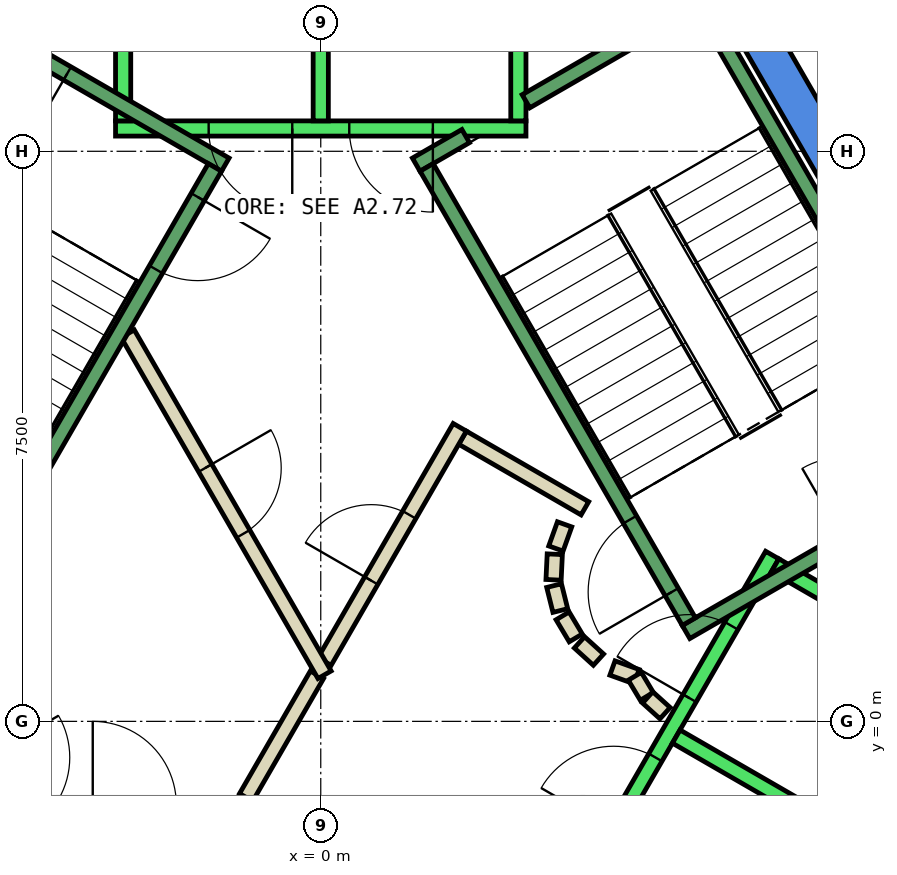
"""IFC4 building model, lengths in metres.
Left out: names, types, materials, properties, quantities, classifications, styles, units other than length and angle.
Written with IfcOpenShell. Run it as: python <this file> out.ifc"""

import sys

from ifc_helpers import new_model, si_unit, direction, frame, frame_2d, origin, place, context, subcontext, project, spatial, polyline, rectangle, outline, extrude, element, fill, save


model = new_model("IFC4")
c1 = context("Model", 3, precision=1e-05, world=origin(), true_north=direction((0.0, 1.0)))
c2 = subcontext(c1, "Body", "Model", "MODEL_VIEW")
j1 = project(units=[si_unit("LENGTHUNIT", "METRE"), si_unit("PLANEANGLEUNIT", "RADIAN")], contexts=[c1])
p1 = place(None, origin())
s1 = spatial("IfcSite", under=j1, at=p1, CompositionType="ELEMENT")
p2 = place(p1, origin())
s2 = spatial("IfcBuilding", under=s1, at=p2, CompositionType="ELEMENT")
p3 = place(p2, frame((0.0, 0.0, 340.4)))
s3 = spatial("IfcBuildingStorey", under=s2, at=p3, CompositionType="ELEMENT", Elevation=340.4)
p4 = place(p3, frame((0.0, 0.0, -0.45)))
e1 = element("IfcWall", 1, at=p4, inside=s3, PredefinedType="SHEAR", context=c2, shape_type="SweptSolid", body=[
    extrude(outline(polyline([(5.486, 9.998), (5.053, 9.748), (9.238, 2.5), (9.815, 2.5), (5.486, 9.998)])), origin(), (0.0, 0.0, 1.0), 4.6),
])
p5 = place(p3, frame((0.0, 0.0, -0.45)))
e2 = element("IfcWall", 2, at=p5, inside=s3, PredefinedType="SHEAR", context=c2, shape_type="SweptSolid", body=[
    extrude(outline(polyline([(4.907, -6.0), (9.815, 2.5), (9.238, 2.5), (4.619, -5.5), (4.907, -6.0)])), origin(), (0.0, 0.0, 1.0), 4.6),
])
p6 = place(p3, frame((-0.982, -1.0, 0.0), z_axis=(0.0, 0.0, 1.0), x_axis=(0.50024047865, 0.865886518847, 0.0)))
e3 = element("IfcWall", 3, at=p6, inside=s3, PredefinedType="PARTITIONING", context=c2, shape_type="SweptSolid", body=[
    extrude(rectangle(XDim=1.863, YDim=0.2, at=frame_2d((0.931, 0.0))), origin(), (0.0, 0.0, 1.0), 4.15),
])
p7 = place(p3, frame((1.866, 3.732, 0.0), z_axis=(0.0, 0.0, 1.0), x_axis=(0.866043361281, -0.499968895414, 0.0)))
e4 = element("IfcWall", 4, at=p7, inside=s3, PredefinedType="PARTITIONING", context=c2, shape_type="SweptSolid", body=[
    extrude(rectangle(XDim=1.858, YDim=0.2, at=frame_2d((0.929, 0.0))), origin(), (0.0, 0.0, 1.0), 4.15),
])
p8 = place(p3, frame((3.208, 2.592, 0.0), z_axis=(0.0, 0.0, 1.0), x_axis=(-0.337388820924, -0.941365382578, 0.0)))
e5 = element("IfcWall", 5, at=p8, inside=s3, PredefinedType="PARTITIONING", context=c2, shape_type="SweptSolid", body=[
    extrude(rectangle(XDim=0.338, YDim=0.2, at=frame_2d((0.169, 0.0))), origin(), (0.0, 0.0, 1.0), 4.15),
])
p9 = place(p3, frame((3.079, 2.199, 0.0), z_axis=(0.0, 0.0, 1.0), x_axis=(-0.047771483479, -0.998858290933, 0.0)))
e6 = element("IfcWall", 6, at=p9, inside=s3, PredefinedType="PARTITIONING", context=c2, shape_type="SweptSolid", body=[
    extrude(rectangle(XDim=0.337, YDim=0.2, at=frame_2d((0.169, 0.0))), origin(), (0.0, 0.0, 1.0), 4.15),
])
p10 = place(p3, frame((3.07, 1.786, 0.0), z_axis=(0.0, 0.0, 1.0), x_axis=(0.242705583207, -0.970099994784, 0.0)))
e7 = element("IfcWall", 7, at=p10, inside=s3, PredefinedType="PARTITIONING", context=c2, shape_type="SweptSolid", body=[
    extrude(rectangle(XDim=0.338, YDim=0.2, at=frame_2d((0.169, 0.0))), origin(), (0.0, 0.0, 1.0), 4.15),
])
for number, where, z_axis, x_axis in (
    (8, (3.182, 1.388, 0.0), (0.0, 0.0, 1.0), (0.512, -0.859, 0.0)),
    (9, (3.404, 1.039, 0.0), (0.0, 0.0, 1.0), (0.74, -0.672, 0.0)),
):
    element("IfcWall", number, at=place(p3, frame(where, z_axis=z_axis, x_axis=x_axis)), inside=s3, PredefinedType="PARTITIONING", context=c2, shape_type="SweptSolid", body=[
        extrude(rectangle(XDim=0.338, YDim=0.2, at=frame_2d((0.169, 0.0))), origin(), (0.0, 0.0, 1.0), 4.15),
    ])
p11 = place(p3, frame((3.838, 0.702, 0.0), z_axis=(0.0, 0.0, 1.0), x_axis=(0.941035081519, -0.338308993895, 0.0)))
e10 = element("IfcWall", 10, at=p11, inside=s3, PredefinedType="PARTITIONING", context=c2, shape_type="SweptSolid", body=[
    extrude(rectangle(XDim=0.337, YDim=0.2, at=frame_2d((0.168, 0.0))), origin(), (0.0, 0.0, 1.0), 4.15),
])
p12 = place(p3, frame((4.132, 0.593, 0.0), z_axis=(0.0, 0.0, 1.0), x_axis=(0.513561617048, -0.858052717201, 0.0)))
e11 = element("IfcWall", 11, at=p12, inside=s3, PredefinedType="PARTITIONING", context=c2, shape_type="SweptSolid", body=[
    extrude(rectangle(XDim=0.308, YDim=0.2, at=frame_2d((0.154, 0.0))), origin(), (0.0, 0.0, 1.0), 4.15),
])
p13 = place(p3, frame((4.301, 0.315, 0.0), z_axis=(0.0, 0.0, 1.0), x_axis=(0.741798017506, -0.670623367639, 0.0)))
e12 = element("IfcWall", 12, at=p13, inside=s3, PredefinedType="PARTITIONING", context=c2, shape_type="SweptSolid", body=[
    extrude(rectangle(XDim=0.309, YDim=0.2, at=frame_2d((0.154, 0.0))), origin(), (0.0, 0.0, 1.0), 4.15),
])
p14 = place(p3, frame((0.05, 0.787, 0.0), z_axis=(0.0, 0.0, 1.0), x_axis=(0.499954076797, 0.866051915934, 0.0)))
e13 = element("IfcWall", 13, at=p14, inside=s3, PredefinedType="PARTITIONING", context=c2, shape_type="SweptSolid", body=[
    extrude(rectangle(XDim=3.558, YDim=0.2, at=frame_2d((1.779, 0.0))), origin(), (0.0, 0.0, 1.0), 4.15),
])
p15 = place(p14, frame((1.229, 0.0, 0.0)))
e14 = element("IfcOpeningElement", 14, at=p15, cuts=e13, PredefinedType="OPENING", context=c2, shape_type="SweptSolid", body=[
    extrude(rectangle(XDim=1.0, YDim=2.1, at=frame_2d((0.5, 1.05))), frame((0.0, 0.11, 0.0), z_axis=(0.0, -1.0, 0.0), x_axis=(1.0, 0.0, 0.0)), (0.0, 0.0, 1.0), 0.22),
])
p16 = place(p3, frame((-2.54, 5.1, 0.0), z_axis=(0.0, 0.0, 1.0), x_axis=(0.499925051871, -0.866068670783, 0.0)))
e15 = element("IfcWall", 15, at=p16, inside=s3, PredefinedType="PARTITIONING", context=c2, shape_type="SweptSolid", body=[
    extrude(rectangle(XDim=5.181, YDim=0.2, at=frame_2d((2.59, 0.0))), origin(), (0.0, 0.0, 1.0), 4.15),
])
p17 = place(p16, frame((2.04, 0.0, 0.0)))
e16 = element("IfcOpeningElement", 16, at=p17, cuts=e15, PredefinedType="OPENING", context=c2, shape_type="SweptSolid", body=[
    extrude(rectangle(XDim=1.0, YDim=2.1, at=frame_2d((0.5, 1.05))), frame((0.0, 0.11, 0.0), z_axis=(0.0, -1.0, 0.0), x_axis=(1.0, 0.0, 0.0)), (0.0, 0.0, 1.0), 0.22),
])
p18 = place(p3, frame((5.532, 14.717, 0.0), z_axis=(0.0, 0.0, 1.0), x_axis=(0.499968011863, -0.866043871356, 0.0)))
e17 = element("IfcWall", 17, at=p18, inside=s3, PredefinedType="PARTITIONING", context=c2, shape_type="SweptSolid", body=[
    extrude(rectangle(XDim=7.201, YDim=0.2, at=frame_2d((3.6, 0.0))), origin(), (0.0, 0.0, 1.0), 4.15),
])
p19 = place(p18, frame((3.18, 0.0, 0.0)))
e18 = element("IfcOpeningElement", 18, at=p19, cuts=e17, PredefinedType="OPENING", context=c2, shape_type="SweptSolid", body=[
    extrude(rectangle(XDim=1.0, YDim=2.1, at=frame_2d((0.5, 1.05))), frame((0.0, 0.11, 0.0), z_axis=(0.0, -1.0, 0.0), x_axis=(1.0, 0.0, 0.0)), (0.0, 0.0, 1.0), 0.22),
])
p20 = place(p3, frame((2.7, 7.8, 0.0), z_axis=(0.0, 0.0, 1.0), x_axis=(-1.0, 0.0, 0.0)))
e19 = element("IfcWall", 19, at=p20, inside=s3, PredefinedType="STANDARD", context=c2, shape_type="SweptSolid", body=[
    extrude(rectangle(XDim=5.4, YDim=0.2, at=frame_2d((2.7, 0.0))), origin(), (0.0, 0.0, 1.0), 4.15),
])
p21 = place(p20, frame((1.225, 0.0, 0.0)))
e20 = element("IfcOpeningElement", 20, at=p21, cuts=e19, PredefinedType="OPENING", context=c2, shape_type="SweptSolid", body=[
    extrude(rectangle(XDim=1.1, YDim=2.1, at=frame_2d((0.55, 1.05))), frame((0.0, 0.11, 0.0), z_axis=(0.0, -1.0, 0.0), x_axis=(1.0, 0.0, 0.0)), (0.0, 0.0, 1.0), 0.22),
])
p22 = place(p20, frame((3.075, 0.0, 0.0)))
e21 = element("IfcOpeningElement", 21, at=p22, cuts=e19, PredefinedType="OPENING", context=c2, shape_type="SweptSolid", body=[
    extrude(rectangle(XDim=1.1, YDim=2.1, at=frame_2d((0.55, 1.05))), frame((0.0, 0.11, 0.0), z_axis=(0.0, -1.0, 0.0), x_axis=(1.0, 0.0, 0.0)), (0.0, 0.0, 1.0), 0.22),
])
for number, where, z_axis, x_axis in (
    (22, (2.6, 7.9, 0.0), (0.0, 0.0, 1.0), (0.0, 1.0, 0.0)),
    (23, (0.0, 7.9, 0.0), (0.0, 0.0, 1.0), (0.0, 1.0, 0.0)),
    (24, (-2.6, 7.9, 0.0), (0.0, 0.0, 1.0), (0.0, 1.0, 0.0)),
):
    element("IfcWall", number, at=place(p3, frame(where, z_axis=z_axis, x_axis=x_axis)), inside=s3, PredefinedType="STANDARD", context=c2, shape_type="SweptSolid", body=[
        extrude(rectangle(XDim=2.4, YDim=0.2, at=frame_2d((1.2, 0.0))), origin(), (0.0, 0.0, 1.0), 4.15),
    ])
p23 = place(p3, frame((-5.94, 2.188, 0.0), z_axis=(0.0, 0.0, 1.0), x_axis=(0.500034260056, -0.866005622828, 0.0)))
e25 = element("IfcWall", 25, at=p23, inside=s3, PredefinedType="STANDARD", context=c2, shape_type="SweptSolid", body=[
    extrude(rectangle(XDim=5.399, YDim=0.2, at=frame_2d((2.7, 0.0))), origin(), (0.0, 0.0, 1.0), 4.15),
])
p24 = place(p23, frame((3.075, 0.0, 0.0)))
e26 = element("IfcOpeningElement", 26, at=p24, cuts=e25, PredefinedType="OPENING", context=c2, shape_type="SweptSolid", body=[
    extrude(rectangle(XDim=1.1, YDim=2.1, at=frame_2d((0.55, 1.05))), frame((0.0, 0.11, 0.0), z_axis=(0.0, -1.0, 0.0), x_axis=(1.0, 0.0, 0.0)), (0.0, 0.0, 1.0), 0.22),
])
p25 = place(p23, frame((1.225, 0.0, 0.0)))
e27 = element("IfcOpeningElement", 27, at=p25, cuts=e25, PredefinedType="OPENING", context=c2, shape_type="SweptSolid", body=[
    extrude(rectangle(XDim=1.1, YDim=2.1, at=frame_2d((0.55, 1.05))), frame((0.0, 0.11, 0.0), z_axis=(0.0, -1.0, 0.0), x_axis=(1.0, 0.0, 0.0)), (0.0, 0.0, 1.0), 0.22),
])
p26 = place(p3, frame((3.24, -2.488, 0.0), z_axis=(0.0, 0.0, 1.0), x_axis=(0.500034260056, 0.866005622828, 0.0)))
e28 = element("IfcWall", 28, at=p26, inside=s3, PredefinedType="STANDARD", context=c2, shape_type="SweptSolid", body=[
    extrude(rectangle(XDim=5.399, YDim=0.2, at=frame_2d((2.7, 0.0))), origin(), (0.0, 0.0, 1.0), 4.15),
])
p27 = place(p26, frame((3.225, 0.0, 0.0)))
e29 = element("IfcOpeningElement", 29, at=p27, cuts=e28, PredefinedType="OPENING", context=c2, shape_type="SweptSolid", body=[
    extrude(rectangle(XDim=1.1, YDim=2.1, at=frame_2d((0.55, 1.05))), frame((0.0, 0.11, 0.0), z_axis=(0.0, -1.0, 0.0), x_axis=(1.0, 0.0, 0.0)), (0.0, 0.0, 1.0), 0.22),
])
p28 = place(p26, frame((1.225, 0.0, 0.0)))
e30 = element("IfcOpeningElement", 30, at=p28, cuts=e28, PredefinedType="OPENING", context=c2, shape_type="SweptSolid", body=[
    extrude(rectangle(XDim=1.1, YDim=2.1, at=frame_2d((0.55, 1.05))), frame((0.0, 0.11, 0.0), z_axis=(0.0, -1.0, 0.0), x_axis=(1.0, 0.0, 0.0)), (0.0, 0.0, 1.0), 0.22),
])
p29 = place(p3, frame((5.492, -3.788, 0.0), z_axis=(0.0, 0.0, 1.0), x_axis=(0.500034260056, 0.866005622828, 0.0)))
e31 = element("IfcWall", 31, at=p29, inside=s3, PredefinedType="STANDARD", context=c2, shape_type="SweptSolid", body=[
    extrude(rectangle(XDim=5.399, YDim=0.2, at=frame_2d((2.7, 0.0))), origin(), (0.0, 0.0, 1.0), 4.15),
])
for number, where, z_axis, x_axis in (
    (32, (4.677, -0.2, 0.0), (0.0, 0.0, 1.0), (0.866, -0.5, 0.0)),
    (33, (5.977, 2.052, 0.0), (0.0, 0.0, 1.0), (0.866, -0.5, 0.0)),
):
    element("IfcWall", number, at=place(p3, frame(where, z_axis=z_axis, x_axis=x_axis)), inside=s3, PredefinedType="STANDARD", context=c2, shape_type="SweptSolid", body=[
        extrude(rectangle(XDim=2.399, YDim=0.2, at=frame_2d((1.2, 0.0))), origin(), (0.0, 0.0, 1.0), 4.15),
    ])
p30 = place(p3, frame((4.806, 1.176, 0.0), z_axis=(0.0, 0.0, 1.0), x_axis=(0.866059941101, 0.499940174841, 0.0)))
e34 = element("IfcWall", 34, at=p30, inside=s3, PredefinedType="STANDARD", context=c2, shape_type="SweptSolid", body=[
    extrude(rectangle(XDim=4.4, YDim=0.2, at=frame_2d((2.2, 0.0))), origin(), (0.0, 0.0, 1.0), 4.15),
])
p31 = place(p30, frame((2.4, 0.0, 0.0)))
e35 = element("IfcOpeningElement", 35, at=p31, cuts=e34, PredefinedType="OPENING", context=c2, shape_type="SweptSolid", body=[
    extrude(rectangle(XDim=1.1, YDim=2.2, at=frame_2d((0.55, 1.1))), frame((0.0, 0.11, 0.0), z_axis=(0.0, -1.0, 0.0), x_axis=(1.0, 0.0, 0.0)), (0.0, 0.0, 1.0), 0.22),
])
p32 = place(p3, frame((2.7, 8.158, 0.0), z_axis=(0.0, 0.0, 1.0), x_axis=(0.86611865017, 0.499838457731, 0.0)))
e36 = element("IfcWall", 36, at=p32, inside=s3, PredefinedType="STANDARD", context=c2, shape_type="SweptSolid", body=[
    extrude(rectangle(XDim=2.733, YDim=0.2, at=frame_2d((1.366, 0.0))), origin(), (0.0, 0.0, 1.0), 4.15),
])
p33 = place(p3, frame((1.256, 7.324, 0.0), z_axis=(0.0, 0.0, 1.0), x_axis=(0.865915093549, 0.500191014278, 0.0)))
e37 = element("IfcWall", 37, at=p33, inside=s3, PredefinedType="STANDARD", context=c2, shape_type="SweptSolid", body=[
    extrude(rectangle(XDim=0.752, YDim=0.2, at=frame_2d((0.376, 0.0))), origin(), (0.0, 0.0, 1.0), 4.15),
])
p34 = place(p3, frame((4.843, 1.312, 0.0), z_axis=(0.0, 0.0, 1.0), x_axis=(-0.499963383562, 0.866046543262, 0.0)))
e38 = element("IfcWall", 38, at=p34, inside=s3, PredefinedType="STANDARD", context=c2, shape_type="SweptSolid", body=[
    extrude(rectangle(XDim=6.9, YDim=0.2, at=frame_2d((3.45, 0.0))), origin(), (0.0, 0.0, 1.0), 4.15),
])
p35 = place(p34, frame((0.45, 0.0, 0.0)))
e39 = element("IfcOpeningElement", 39, at=p35, cuts=e38, PredefinedType="OPENING", context=c2, shape_type="SweptSolid", body=[
    extrude(rectangle(XDim=1.1, YDim=2.2, at=frame_2d((0.55, 1.1))), frame((0.0, 0.11, 0.0), z_axis=(0.0, -1.0, 0.0), x_axis=(1.0, 0.0, 0.0)), (0.0, 0.0, 1.0), 0.22),
])
p36 = place(p3, frame((8.48, 3.412, 0.0), z_axis=(0.0, 0.0, 1.0), x_axis=(-0.499978703459, 0.866037698999, 0.0)))
e40 = element("IfcWall", 40, at=p36, inside=s3, PredefinedType="STANDARD", context=c2, shape_type="SweptSolid", body=[
    extrude(rectangle(XDim=6.9, YDim=0.2, at=frame_2d((3.45, 0.0))), origin(), (0.0, 0.0, 1.0), 4.15),
])
p37 = place(p3, frame((-1.256, 7.324, 0.0), z_axis=(0.0, 0.0, 1.0), x_axis=(-0.866046073146, 0.499964197906, 0.0)))
e41 = element("IfcWall", 41, at=p37, inside=s3, PredefinedType="STANDARD", context=c2, shape_type="SweptSolid", body=[
    extrude(rectangle(XDim=4.4, YDim=0.2, at=frame_2d((2.2, 0.0))), origin(), (0.0, 0.0, 1.0), 4.15),
])
p38 = place(p37, frame((2.4, 0.0, 0.0)))
e42 = element("IfcOpeningElement", 42, at=p38, cuts=e41, PredefinedType="OPENING", context=c2, shape_type="SweptSolid", body=[
    extrude(rectangle(XDim=1.1, YDim=2.2, at=frame_2d((0.55, 1.1))), frame((0.0, 0.11, 0.0), z_axis=(0.0, -1.0, 0.0), x_axis=(1.0, 0.0, 0.0)), (0.0, 0.0, 1.0), 0.22),
])
p39 = place(p3, frame((-1.393, 7.288, 0.0), z_axis=(0.0, 0.0, 1.0), x_axis=(-0.499963383562, -0.866046543262, 0.0)))
e43 = element("IfcWall", 43, at=p39, inside=s3, PredefinedType="STANDARD", context=c2, shape_type="SweptSolid", body=[
    extrude(rectangle(XDim=6.9, YDim=0.2, at=frame_2d((3.45, 0.0))), origin(), (0.0, 0.0, 1.0), 4.15),
])
p40 = place(p39, frame((0.45, 0.0, 0.0)))
e44 = element("IfcOpeningElement", 44, at=p40, cuts=e43, PredefinedType="OPENING", context=c2, shape_type="SweptSolid", body=[
    extrude(rectangle(XDim=1.1, YDim=2.2, at=frame_2d((0.55, 1.1))), frame((0.0, 0.11, 0.0), z_axis=(0.0, -1.0, 0.0), x_axis=(1.0, 0.0, 0.0)), (0.0, 0.0, 1.0), 0.22),
])
p41 = place(p15, origin())
e45 = element("IfcDoor", 45, at=p41, inside=s3, OperationType="SINGLE_SWING_RIGHT", PredefinedType="DOOR", context=c2, shape_type="SweptSolid", body=[
    extrude(rectangle(XDim=1.0, YDim=2.1, at=frame_2d((0.5, 1.05))), frame((0.0, 0.025, 0.0), z_axis=(0.0, -1.0, 0.0), x_axis=(1.0, 0.0, 0.0)), (0.0, 0.0, 1.0), 0.05),
])
fill(e14, e45)
p42 = place(p17, origin())
e46 = element("IfcDoor", 46, at=p42, inside=s3, OperationType="SINGLE_SWING_RIGHT", PredefinedType="DOOR", context=c2, shape_type="SweptSolid", body=[
    extrude(rectangle(XDim=1.0, YDim=2.1, at=frame_2d((0.5, 1.05))), frame((0.0, 0.025, 0.0), z_axis=(0.0, -1.0, 0.0), x_axis=(1.0, 0.0, 0.0)), (0.0, 0.0, 1.0), 0.05),
])
fill(e16, e46)
p43 = place(p21, origin())
e47 = element("IfcDoor", 47, at=p43, inside=s3, OperationType="SLIDING_TO_LEFT", PredefinedType="DOOR", context=c2, shape_type="SweptSolid", body=[
    extrude(rectangle(XDim=1.1, YDim=2.1, at=frame_2d((0.55, 1.05))), frame((0.0, 0.025, 0.0), z_axis=(0.0, -1.0, 0.0), x_axis=(1.0, 0.0, 0.0)), (0.0, 0.0, 1.0), 0.05),
])
fill(e20, e47)
p44 = place(p22, origin())
e48 = element("IfcDoor", 48, at=p44, inside=s3, OperationType="SLIDING_TO_LEFT", PredefinedType="DOOR", context=c2, shape_type="SweptSolid", body=[
    extrude(rectangle(XDim=1.1, YDim=2.1, at=frame_2d((0.55, 1.05))), frame((0.0, 0.025, 0.0), z_axis=(0.0, -1.0, 0.0), x_axis=(1.0, 0.0, 0.0)), (0.0, 0.0, 1.0), 0.05),
])
fill(e21, e48)
p45 = place(p27, origin())
e49 = element("IfcDoor", 49, at=p45, inside=s3, OperationType="SLIDING_TO_LEFT", PredefinedType="DOOR", context=c2, shape_type="SweptSolid", body=[
    extrude(rectangle(XDim=1.1, YDim=2.1, at=frame_2d((0.55, 1.05))), frame((0.0, 0.025, 0.0), z_axis=(0.0, -1.0, 0.0), x_axis=(1.0, 0.0, 0.0)), (0.0, 0.0, 1.0), 0.05),
])
fill(e29, e49)
p46 = place(p28, origin())
e50 = element("IfcDoor", 50, at=p46, inside=s3, OperationType="SLIDING_TO_LEFT", PredefinedType="DOOR", context=c2, shape_type="SweptSolid", body=[
    extrude(rectangle(XDim=1.1, YDim=2.1, at=frame_2d((0.55, 1.05))), frame((0.0, 0.025, 0.0), z_axis=(0.0, -1.0, 0.0), x_axis=(1.0, 0.0, 0.0)), (0.0, 0.0, 1.0), 0.05),
])
fill(e30, e50)
p47 = place(p35, origin())
e51 = element("IfcDoor", 51, at=p47, inside=s3, OperationType="SINGLE_SWING_LEFT", PredefinedType="DOOR", context=c2, shape_type="SweptSolid", body=[
    extrude(rectangle(XDim=1.1, YDim=2.2, at=frame_2d((0.55, 1.1))), frame((0.0, 0.025, 0.0), z_axis=(0.0, -1.0, 0.0), x_axis=(1.0, 0.0, 0.0)), (0.0, 0.0, 1.0), 0.05),
])
fill(e39, e51)
p48 = place(p40, origin())
e52 = element("IfcDoor", 52, at=p48, inside=s3, OperationType="SINGLE_SWING_LEFT", PredefinedType="DOOR", context=c2, shape_type="SweptSolid", body=[
    extrude(rectangle(XDim=1.1, YDim=2.2, at=frame_2d((0.55, 1.1))), frame((0.0, 0.025, 0.0), z_axis=(0.0, -1.0, 0.0), x_axis=(1.0, 0.0, 0.0)), (0.0, 0.0, 1.0), 0.05),
])
fill(e44, e52)
p49 = place(p38, origin())
e53 = element("IfcDoor", 53, at=p49, inside=s3, OperationType="SINGLE_SWING_LEFT", PredefinedType="DOOR", context=c2, shape_type="SweptSolid", body=[
    extrude(rectangle(XDim=1.1, YDim=2.2, at=frame_2d((0.55, 1.1))), frame((0.0, 0.025, 0.0), z_axis=(0.0, -1.0, 0.0), x_axis=(1.0, 0.0, 0.0)), (0.0, 0.0, 1.0), 0.05),
])
fill(e42, e53)
save(model, sys.argv[1])
